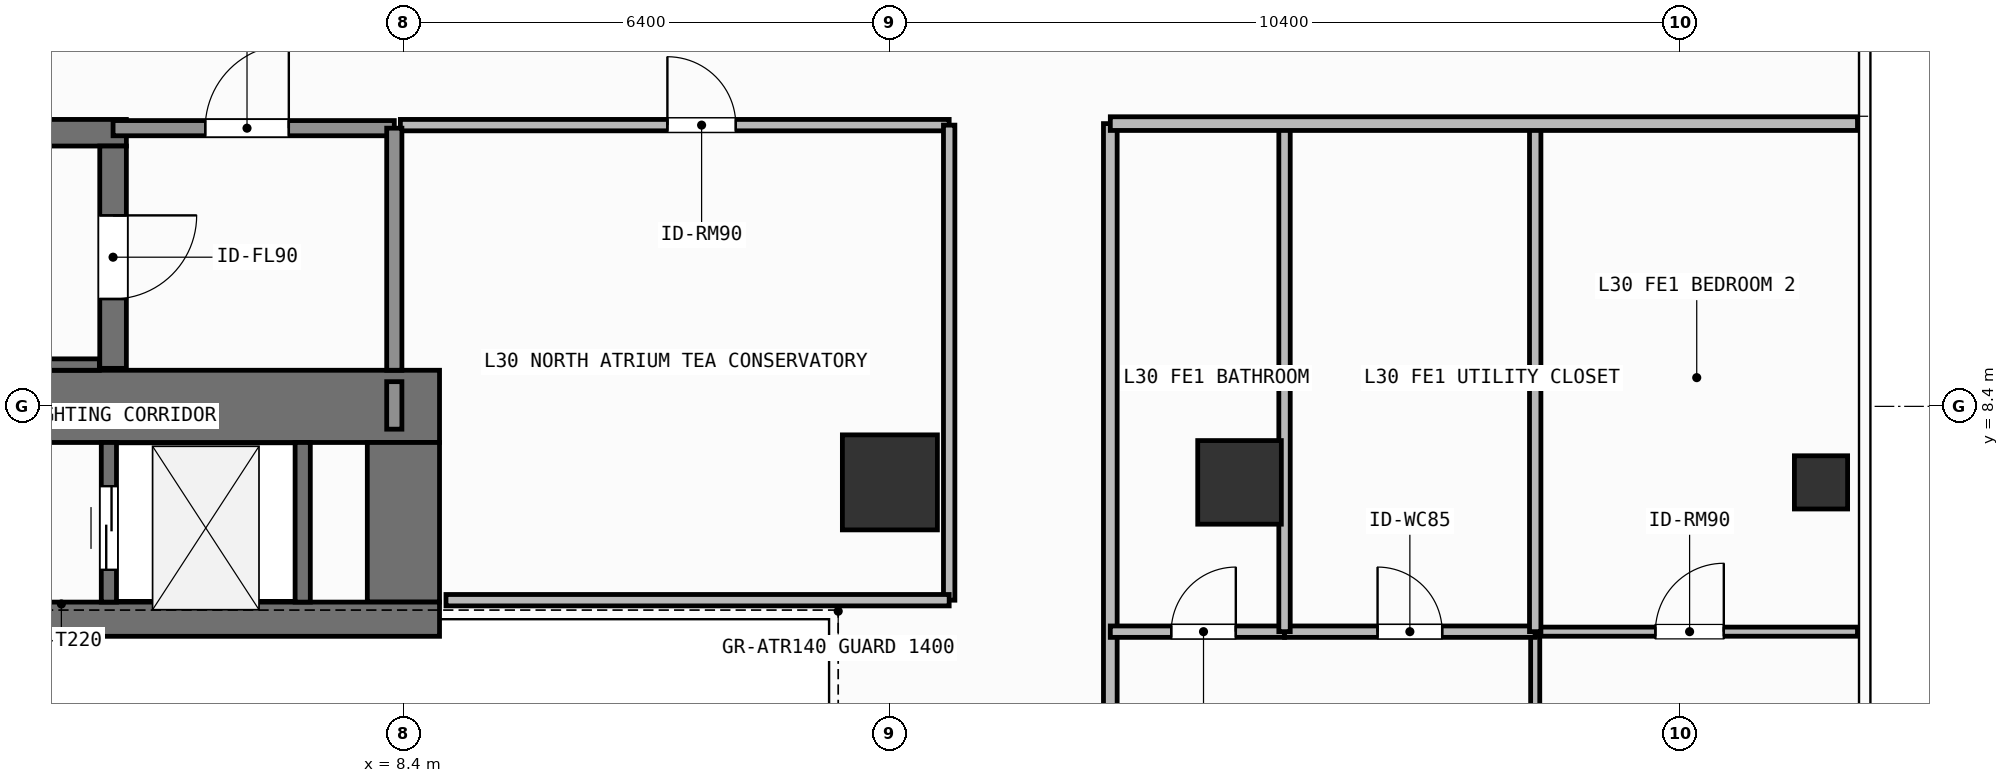
"""IFC4 building model, lengths in metres.
Left out: names, types, materials, properties, quantities, classifications, styles, units other than length and angle.
Written with IfcOpenShell. Run it as: python <this file> out.ifc"""

import sys

from ifc_helpers import new_model, si_unit, direction, frame, frame_2d, origin, origin_2d, place, context, subcontext, project, spatial, rectangle, hollow_rectangle, extrude, element, fill, save


model = new_model("IFC4")
c1 = context("Model", 3, precision=1e-05, world=origin(), true_north=direction((0.0, 1.0)))
c2 = subcontext(c1, "Body", "Model", "MODEL_VIEW")
j1 = project(units=[si_unit("LENGTHUNIT", "METRE"), si_unit("PLANEANGLEUNIT", "RADIAN")], contexts=[c1])
p1 = place(None, origin())
s1 = spatial("IfcSite", under=j1, at=p1, CompositionType="ELEMENT")
p2 = place(p1, origin())
s2 = spatial("IfcBuilding", under=s1, at=p2, CompositionType="ELEMENT")
p3 = place(p2, frame((0.0, 0.0, 121.2)))
s3 = spatial("IfcBuildingStorey", under=s2, at=p3, CompositionType="ELEMENT", Elevation=121.2)
p4 = place(p3, frame((-7.55, 8.4, 0.0), z_axis=(0.0, 0.0, 1.0), x_axis=(1.0, 0.0, 0.0)))
e1 = element("IfcWall", 1, at=p4, inside=s3, PredefinedType="SHEAR", context=c2, shape_type="SweptSolid", body=[
    extrude(rectangle(XDim=16.425, YDim=0.95, at=frame_2d((8.212, 0.0))), origin(), (0.0, 0.0, 1.0), 3.9),
])
p5 = place(p3, frame((8.4, 5.825, 0.0), z_axis=(0.0, 0.0, 1.0), x_axis=(0.0, 1.0, 0.0)))
e2 = element("IfcWall", 2, at=p5, inside=s3, PredefinedType="SHEAR", context=c2, shape_type="SweptSolid", body=[
    extrude(rectangle(XDim=2.1, YDim=0.95, at=frame_2d((1.05, 0.0))), origin(), (0.0, 0.0, 1.0), 3.9),
])
p6 = place(p3, frame((3.045, 5.6, 0.0), z_axis=(0.0, 0.0, 1.0), x_axis=(1.0, 0.0, 0.0)))
e3 = element("IfcWall", 3, at=p6, inside=s3, PredefinedType="SHEAR", context=c2, shape_type="SweptSolid", body=[
    extrude(rectangle(XDim=5.83, YDim=0.45, at=frame_2d((2.915, 0.0))), origin(), (0.0, 0.0, 1.0), 3.9),
])
p7 = place(p3, frame((-2.555, 12.0, 0.0), z_axis=(0.0, 0.0, 1.0), x_axis=(1.0, 0.0, 0.0)))
e4 = element("IfcWall", 4, at=p7, inside=s3, PredefinedType="SHEAR", context=c2, shape_type="SweptSolid", body=[
    extrude(rectangle(XDim=7.31, YDim=0.35, at=frame_2d((3.655, 0.0))), origin(), (0.0, 0.0, 1.0), 3.9),
])
p8 = place(p3, frame((-2.2, 8.95, 0.0), z_axis=(0.0, 0.0, 1.0), x_axis=(1.0, 0.0, 0.0)))
e5 = element("IfcWall", 5, at=p8, inside=s3, PredefinedType="SHEAR", context=c2, shape_type="SweptSolid", body=[
    extrude(rectangle(XDim=6.6, YDim=0.15, at=frame_2d((3.3, 0.0))), origin(), (0.0, 0.0, 1.0), 3.9),
])
p9 = place(p3, frame((4.58, 11.825, 0.0), z_axis=(0.0, 0.0, 1.0), x_axis=(0.0, -1.0, 0.0)))
e6 = element("IfcWall", 6, at=p9, inside=s3, PredefinedType="SHEAR", context=c2, shape_type="SweptSolid", body=[
    extrude(rectangle(XDim=2.925, YDim=0.35, at=frame_2d((1.462, 0.0))), origin(), (0.0, 0.0, 1.0), 3.9),
])
p10 = place(p9, frame((0.913, 0.0, 0.0)))
e7 = element("IfcOpeningElement", 7, at=p10, cuts=e6, PredefinedType="OPENING", context=c2, shape_type="SweptSolid", body=[
    extrude(rectangle(XDim=1.1, YDim=2.15, at=frame_2d((0.55, 1.075))), frame((0.0, 0.185, 0.0), z_axis=(0.0, -1.0, 0.0), x_axis=(1.0, 0.0, 0.0)), (0.0, 0.0, 1.0), 0.37),
])
p11 = place(p3, frame((14.8, 7.4, 0.0), z_axis=(0.0, 0.0, 1.0), x_axis=(1.0, 0.0, 0.0)))
e8 = element("IfcColumn", 8, at=p11, inside=s3, PredefinedType="COLUMN", context=c2, shape_type="SweptSolid", body=[
    extrude(rectangle(XDim=1.25, YDim=1.25, at=origin_2d()), origin(), (0.0, 0.0, 1.0), 3.9),
])
p12 = place(p3, frame((19.4, 7.4, 0.0), z_axis=(0.0, 0.0, 1.0), x_axis=(1.0, 0.0, 0.0)))
e9 = element("IfcColumn", 9, at=p12, inside=s3, PredefinedType="COLUMN", context=c2, shape_type="SweptSolid", body=[
    extrude(rectangle(XDim=1.1, YDim=1.1, at=origin_2d()), origin(), (0.0, 0.0, 1.0), 3.9),
])
p13 = place(p3, frame((27.05, 7.4, 0.0), z_axis=(0.0, 0.0, 1.0), x_axis=(1.0, 0.0, 0.0)))
e10 = element("IfcColumn", 10, at=p13, inside=s3, PredefinedType="COLUMN", context=c2, shape_type="SweptSolid", body=[
    extrude(hollow_rectangle(XDim=0.7, YDim=0.7, WallThickness=0.032, at=origin_2d()), origin(), (0.0, 0.0, 1.0), 3.9),
])
p14 = place(p3, frame((4.525, 5.825, 0.0), z_axis=(0.0, 0.0, 1.0), x_axis=(0.0, 1.0, 0.0)))
e11 = element("IfcWall", 11, at=p14, inside=s3, PredefinedType="SHEAR", context=c2, shape_type="SweptSolid", body=[
    extrude(rectangle(XDim=2.1, YDim=0.2, at=frame_2d((1.05, 0.0))), origin(), (0.0, 0.0, 1.0), 3.68),
])
p15 = place(p14, frame((0.425, 0.0, 0.0)))
e12 = element("IfcOpeningElement", 12, at=p15, cuts=e11, PredefinedType="OPENING", context=c2, shape_type="SweptSolid", body=[
    extrude(rectangle(XDim=1.1, YDim=2.2, at=frame_2d((0.55, 1.1))), frame((0.0, 0.11, 0.0), z_axis=(0.0, -1.0, 0.0), x_axis=(1.0, 0.0, 0.0)), (0.0, 0.0, 1.0), 0.22),
])
p16 = place(p3, frame((7.075, 5.825, 0.0), z_axis=(0.0, 0.0, 1.0), x_axis=(0.0, 1.0, 0.0)))
e13 = element("IfcWall", 13, at=p16, inside=s3, PredefinedType="SHEAR", context=c2, shape_type="SweptSolid", body=[
    extrude(rectangle(XDim=2.1, YDim=0.2, at=frame_2d((1.05, 0.0))), origin(), (0.0, 0.0, 1.0), 3.68),
])
p17 = place(p3, frame((4.58, 12.06, 0.0), z_axis=(0.0, 0.0, 1.0), x_axis=(1.0, 0.0, 0.0)))
e14 = element("IfcWall", 14, at=p17, inside=s3, PredefinedType="SOLIDWALL", context=c2, shape_type="SweptSolid", body=[
    extrude(rectangle(XDim=3.7, YDim=0.2, at=frame_2d((1.85, 0.0))), origin(), (0.0, 0.0, 1.0), 3.68),
])
p18 = place(p17, frame((1.212, 0.0, 0.0)))
e15 = element("IfcOpeningElement", 15, at=p18, cuts=e14, PredefinedType="OPENING", context=c2, shape_type="SweptSolid", body=[
    extrude(rectangle(XDim=1.1, YDim=2.15, at=frame_2d((0.55, 1.075))), frame((0.0, 0.11, 0.0), z_axis=(0.0, -1.0, 0.0), x_axis=(1.0, 0.0, 0.0)), (0.0, 0.0, 1.0), 0.22),
])
p19 = place(p3, frame((8.36, 12.1, 0.0), z_axis=(0.0, 0.0, 1.0), x_axis=(1.0, 0.0, 0.0)))
e16 = element("IfcWall", 16, at=p19, inside=s3, PredefinedType="PARTITIONING", context=c2, shape_type="SweptSolid", body=[
    extrude(rectangle(XDim=7.22, YDim=0.15, at=frame_2d((3.61, 0.0))), origin(), (0.0, 0.0, 1.0), 3.68),
])
p20 = place(p19, frame((3.513, 0.0, 0.0)))
e17 = element("IfcOpeningElement", 17, at=p20, cuts=e16, PredefinedType="OPENING", context=c2, shape_type="SweptSolid", body=[
    extrude(rectangle(XDim=0.9, YDim=2.1, at=frame_2d((0.45, 1.05))), frame((0.0, 0.085, 0.0), z_axis=(0.0, -1.0, 0.0), x_axis=(1.0, 0.0, 0.0)), (0.0, 0.0, 1.0), 0.17),
])
p21 = place(p3, frame((17.7, -12.12, 0.0), z_axis=(0.0, 0.0, 1.0), x_axis=(0.0, 1.0, 0.0)))
e18 = element("IfcWall", 18, at=p21, inside=s3, PredefinedType="PARTITIONING", context=c2, shape_type="SweptSolid", body=[
    extrude(rectangle(XDim=24.24, YDim=0.18, at=frame_2d((12.12, 0.0))), origin(), (0.0, 0.0, 1.0), 3.68),
])
p22 = place(p21, frame((11.62, 0.0, 0.0)))
e19 = element("IfcOpeningElement", 19, at=p22, cuts=e18, PredefinedType="OPENING", context=c2, shape_type="SweptSolid", body=[
    extrude(rectangle(XDim=1.0, YDim=2.2, at=frame_2d((0.5, 1.1))), frame((0.0, 0.1, 0.0), z_axis=(0.0, -1.0, 0.0), x_axis=(1.0, 0.0, 0.0)), (0.0, 0.0, 1.0), 0.2),
])
p23 = place(p3, frame((23.29, -5.436, 0.0), z_axis=(0.0, 0.0, 1.0), x_axis=(0.0, 1.0, 0.0)))
e20 = element("IfcWall", 20, at=p23, inside=s3, PredefinedType="PARTITIONING", context=c2, shape_type="SweptSolid", body=[
    extrude(rectangle(XDim=10.872, YDim=0.12, at=frame_2d((5.436, 0.0))), origin(), (0.0, 0.0, 1.0), 3.68),
])
p24 = place(p23, frame((4.986, 0.0, 0.0)))
e21 = element("IfcOpeningElement", 21, at=p24, cuts=e20, PredefinedType="OPENING", context=c2, shape_type="SweptSolid", body=[
    extrude(rectangle(XDim=0.9, YDim=2.1, at=frame_2d((0.45, 1.05))), frame((0.0, 0.07, 0.0), z_axis=(0.0, -1.0, 0.0), x_axis=(1.0, 0.0, 0.0)), (0.0, 0.0, 1.0), 0.14),
])
p25 = place(p3, frame((17.7, 5.436, 0.0), z_axis=(0.0, 0.0, 1.0), x_axis=(1.0, 0.0, 0.0)))
e22 = element("IfcWall", 22, at=p25, inside=s3, PredefinedType="PARTITIONING", context=c2, shape_type="SweptSolid", body=[
    extrude(rectangle(XDim=2.292, YDim=0.15, at=frame_2d((1.146, 0.0))), origin(), (0.0, 0.0, 1.0), 3.68),
])
p26 = place(p25, frame((0.801, 0.0, 0.0)))
e23 = element("IfcOpeningElement", 23, at=p26, cuts=e22, PredefinedType="OPENING", context=c2, shape_type="SweptSolid", body=[
    extrude(rectangle(XDim=0.85, YDim=2.1, at=frame_2d((0.425, 1.05))), frame((0.0, 0.085, 0.0), z_axis=(0.0, -1.0, 0.0), x_axis=(1.0, 0.0, 0.0)), (0.0, 0.0, 1.0), 0.17),
])
p27 = place(p3, frame((19.992, 5.436, 0.0), z_axis=(0.0, 0.0, 1.0), x_axis=(1.0, 0.0, 0.0)))
e24 = element("IfcWall", 24, at=p27, inside=s3, PredefinedType="PARTITIONING", context=c2, shape_type="SweptSolid", body=[
    extrude(rectangle(XDim=3.298, YDim=0.15, at=frame_2d((1.649, 0.0))), origin(), (0.0, 0.0, 1.0), 3.68),
])
p28 = place(p27, frame((1.224, 0.0, 0.0)))
e25 = element("IfcOpeningElement", 25, at=p28, cuts=e24, PredefinedType="OPENING", context=c2, shape_type="SweptSolid", body=[
    extrude(rectangle(XDim=0.85, YDim=2.1, at=frame_2d((0.425, 1.05))), frame((0.0, 0.085, 0.0), z_axis=(0.0, -1.0, 0.0), x_axis=(1.0, 0.0, 0.0)), (0.0, 0.0, 1.0), 0.17),
])
p29 = place(p3, frame((23.29, 5.436, 0.0), z_axis=(0.0, 0.0, 1.0), x_axis=(1.0, 0.0, 0.0)))
e26 = element("IfcWall", 26, at=p29, inside=s3, PredefinedType="PARTITIONING", context=c2, shape_type="SweptSolid", body=[
    extrude(rectangle(XDim=4.24, YDim=0.12, at=frame_2d((2.12, 0.0))), origin(), (0.0, 0.0, 1.0), 3.68),
])
p30 = place(p29, frame((1.581, 0.0, 0.0)))
e27 = element("IfcOpeningElement", 27, at=p30, cuts=e26, PredefinedType="OPENING", context=c2, shape_type="SweptSolid", body=[
    extrude(rectangle(XDim=0.9, YDim=2.1, at=frame_2d((0.45, 1.05))), frame((0.0, 0.07, 0.0), z_axis=(0.0, -1.0, 0.0), x_axis=(1.0, 0.0, 0.0)), (0.0, 0.0, 1.0), 0.14),
])
p31 = place(p3, frame((8.28, 8.875, 0.0), z_axis=(0.0, 0.0, 1.0), x_axis=(0.0, 1.0, 0.0)))
e28 = element("IfcWall", 28, at=p31, inside=s3, PredefinedType="SOLIDWALL", context=c2, shape_type="SweptSolid", body=[
    extrude(rectangle(XDim=3.185, YDim=0.2, at=frame_2d((1.593, 0.0))), origin(), (0.0, 0.0, 1.0), 3.68),
])
p32 = place(p3, frame((8.28, 8.1, 0.0), z_axis=(0.0, 0.0, 1.0), x_axis=(0.0, 1.0, 0.0)))
e29 = element("IfcWall", 29, at=p32, inside=s3, PredefinedType="SOLIDWALL", context=c2, shape_type="SweptSolid", body=[
    extrude(rectangle(XDim=0.625, YDim=0.2, at=frame_2d((0.312, 0.0))), origin(), (0.0, 0.0, 1.0), 3.68),
])
p33 = place(p3, frame((15.58, 5.85, 0.0), z_axis=(0.0, 0.0, 1.0), x_axis=(0.0, 1.0, 0.0)))
e30 = element("IfcWall", 30, at=p33, inside=s3, PredefinedType="PARTITIONING", context=c2, shape_type="SweptSolid", body=[
    extrude(rectangle(XDim=6.25, YDim=0.15, at=frame_2d((3.125, 0.0))), origin(), (0.0, 0.0, 1.0), 3.68),
])
p34 = place(p3, frame((8.96, 5.85, 0.0), z_axis=(0.0, 0.0, 1.0), x_axis=(1.0, 0.0, 0.0)))
e31 = element("IfcWall", 31, at=p34, inside=s3, PredefinedType="PARTITIONING", context=c2, shape_type="SweptSolid", body=[
    extrude(rectangle(XDim=6.62, YDim=0.15, at=frame_2d((3.31, 0.0))), origin(), (0.0, 0.0, 1.0), 3.68),
])
for number, where, z_axis, x_axis in (
    (32, (19.992, 5.436, 0.0), (0.0, 0.0, 1.0), (0.0, 1.0, 0.0)),
    (33, (23.29, 5.436, 0.0), (0.0, 0.0, 1.0), (0.0, 1.0, 0.0)),
):
    element("IfcWall", number, at=place(p3, frame(where, z_axis=z_axis, x_axis=x_axis)), inside=s3, PredefinedType="PARTITIONING", context=c2, shape_type="SweptSolid", body=[
        extrude(rectangle(XDim=6.684, YDim=0.15, at=frame_2d((3.342, 0.0))), origin(), (0.0, 0.0, 1.0), 3.68),
    ])
p35 = place(p3, frame((17.7, 12.12, 0.0), z_axis=(0.0, 0.0, 1.0), x_axis=(1.0, 0.0, 0.0)))
e34 = element("IfcWall", 34, at=p35, inside=s3, PredefinedType="PARTITIONING", context=c2, shape_type="SweptSolid", body=[
    extrude(rectangle(XDim=9.83, YDim=0.18, at=frame_2d((4.915, 0.0))), origin(), (0.0, 0.0, 1.0), 3.68),
])
p36 = place(p15, origin())
e35 = element("IfcDoor", 35, at=p36, inside=s3, OperationType="SLIDING_TO_LEFT", PredefinedType="DOOR", context=c2, shape_type="SweptSolid", body=[
    extrude(rectangle(XDim=1.1, YDim=2.2, at=frame_2d((0.55, 1.1))), frame((0.0, 0.025, 0.0), z_axis=(0.0, -1.0, 0.0), x_axis=(1.0, 0.0, 0.0)), (0.0, 0.0, 1.0), 0.05),
])
fill(e12, e35)
p37 = place(p10, origin())
e36 = element("IfcDoor", 36, at=p37, inside=s3, OperationType="SINGLE_SWING_LEFT", PredefinedType="DOOR", context=c2, shape_type="SweptSolid", body=[
    extrude(rectangle(XDim=1.1, YDim=2.15, at=frame_2d((0.55, 1.075))), frame((0.0, 0.025, 0.0), z_axis=(0.0, -1.0, 0.0), x_axis=(1.0, 0.0, 0.0)), (0.0, 0.0, 1.0), 0.05),
])
fill(e7, e36)
p38 = place(p18, origin())
e37 = element("IfcDoor", 37, at=p38, inside=s3, OperationType="SINGLE_SWING_RIGHT", PredefinedType="DOOR", context=c2, shape_type="SweptSolid", body=[
    extrude(rectangle(XDim=1.1, YDim=2.15, at=frame_2d((0.55, 1.075))), frame((0.0, 0.025, 0.0), z_axis=(0.0, -1.0, 0.0), x_axis=(1.0, 0.0, 0.0)), (0.0, 0.0, 1.0), 0.05),
])
fill(e15, e37)
p39 = place(p20, origin())
e38 = element("IfcDoor", 38, at=p39, inside=s3, OperationType="SINGLE_SWING_LEFT", PredefinedType="DOOR", context=c2, shape_type="SweptSolid", body=[
    extrude(rectangle(XDim=0.9, YDim=2.1, at=frame_2d((0.45, 1.05))), frame((0.0, 0.025, 0.0), z_axis=(0.0, -1.0, 0.0), x_axis=(1.0, 0.0, 0.0)), (0.0, 0.0, 1.0), 0.05),
])
fill(e17, e38)
p40 = place(p26, origin())
e39 = element("IfcDoor", 39, at=p40, inside=s3, OperationType="SINGLE_SWING_RIGHT", PredefinedType="DOOR", context=c2, shape_type="SweptSolid", body=[
    extrude(rectangle(XDim=0.85, YDim=2.1, at=frame_2d((0.425, 1.05))), frame((0.0, 0.025, 0.0), z_axis=(0.0, -1.0, 0.0), x_axis=(1.0, 0.0, 0.0)), (0.0, 0.0, 1.0), 0.05),
])
fill(e23, e39)
p41 = place(p28, origin())
e40 = element("IfcDoor", 40, at=p41, inside=s3, OperationType="SINGLE_SWING_LEFT", PredefinedType="DOOR", context=c2, shape_type="SweptSolid", body=[
    extrude(rectangle(XDim=0.85, YDim=2.1, at=frame_2d((0.425, 1.05))), frame((0.0, 0.025, 0.0), z_axis=(0.0, -1.0, 0.0), x_axis=(1.0, 0.0, 0.0)), (0.0, 0.0, 1.0), 0.05),
])
fill(e25, e40)
p42 = place(p30, origin())
e41 = element("IfcDoor", 41, at=p42, inside=s3, OperationType="SINGLE_SWING_RIGHT", PredefinedType="DOOR", context=c2, shape_type="SweptSolid", body=[
    extrude(rectangle(XDim=0.9, YDim=2.1, at=frame_2d((0.45, 1.05))), frame((0.0, 0.025, 0.0), z_axis=(0.0, -1.0, 0.0), x_axis=(1.0, 0.0, 0.0)), (0.0, 0.0, 1.0), 0.05),
])
fill(e27, e41)
save(model, sys.argv[1])
